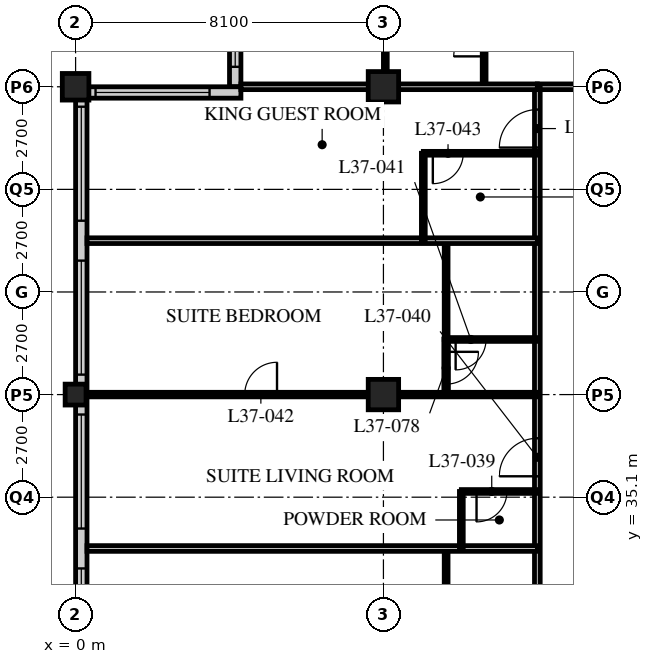
"""IFC4 building model, lengths in metres.
Left out: names, types, materials, properties, quantities, classifications, styles, units other than length and angle.
Written with IfcOpenShell. Run it as: python <this file> out.ifc"""

import sys

from ifc_helpers import new_model, si_unit, direction, frame, frame_2d, origin, origin_2d, place, context, subcontext, project, spatial, rectangle, hollow_rectangle, extrude, element, fill, save


model = new_model("IFC4")
c1 = context("Model", 3, precision=1e-05, world=origin(), true_north=direction((0.0, 1.0)))
c2 = subcontext(c1, "Body", "Model", "MODEL_VIEW")
j1 = project(units=[si_unit("LENGTHUNIT", "METRE"), si_unit("PLANEANGLEUNIT", "RADIAN")], contexts=[c1])
p1 = place(None, origin())
s1 = spatial("IfcSite", under=j1, at=p1, CompositionType="ELEMENT")
p2 = place(p1, origin())
s2 = spatial("IfcBuilding", under=s1, at=p2, CompositionType="ELEMENT")
p3 = place(p2, frame((0.0, 0.0, 144.2)))
s3 = spatial("IfcBuildingStorey", under=s2, at=p3, CompositionType="ELEMENT", Elevation=144.2)
p4 = place(p3, frame((0.0, 37.8, 0.0), z_axis=(0.0, 0.0, 1.0), x_axis=(1.0, 0.0, 0.0)))
e1 = element("IfcColumn", 1, at=p4, inside=s3, PredefinedType="COLUMN", context=c2, shape_type="SweptSolid", body=[
    extrude(hollow_rectangle(XDim=0.55, YDim=0.55, WallThickness=0.04, at=origin_2d()), origin(), (0.0, 0.0, 1.0), 3.4),
])
p5 = place(p3, frame((0.0, 45.9, 0.0), z_axis=(0.0, 0.0, 1.0), x_axis=(1.0, 0.0, 0.0)))
e2 = element("IfcColumn", 2, at=p5, inside=s3, PredefinedType="COLUMN", context=c2, shape_type="SweptSolid", body=[
    extrude(hollow_rectangle(XDim=0.7, YDim=0.7, WallThickness=0.07, at=origin_2d()), origin(), (0.0, 0.0, 1.0), 3.4),
])
for number, where, z_axis, x_axis in (
    (3, (8.1, 37.8, 0.0), (0.0, 0.0, 1.0), (1.0, 0.0, 0.0)),
    (4, (8.1, 45.9, 0.0), (0.0, 0.0, 1.0), (1.0, 0.0, 0.0)),
):
    element("IfcColumn", number, at=place(p3, frame(where, z_axis=z_axis, x_axis=x_axis)), inside=s3, PredefinedType="COLUMN", context=c2, shape_type="SweptSolid", body=[
        extrude(hollow_rectangle(XDim=0.8, YDim=0.8, WallThickness=0.08, at=origin_2d()), origin(), (0.0, 0.0, 1.0), 3.4),
    ])
p6 = place(p3, frame((4.2, 49.65, 0.0), z_axis=(0.0, 0.0, 1.0), x_axis=(0.0, -1.0, 0.0)))
e5 = element("IfcWall", 5, at=p6, inside=s3, PredefinedType="SOLIDWALL", context=c2, shape_type="SweptSolid", body=[
    extrude(rectangle(XDim=3.75, YDim=0.3, at=frame_2d((1.875, 0.0))), origin(), (0.0, 0.0, 1.0), 3.19),
])
p7 = place(p6, frame((0.225, 0.0, 0.9)))
e6 = element("IfcOpeningElement", 6, at=p7, cuts=e5, PredefinedType="OPENING", context=c2, shape_type="SweptSolid", body=[
    extrude(rectangle(XDim=3.0, YDim=1.4, at=frame_2d((1.5, 0.7))), frame((0.0, 0.16, 0.0), z_axis=(0.0, -1.0, 0.0), x_axis=(1.0, 0.0, 0.0)), (0.0, 0.0, 1.0), 0.32),
])
p8 = place(p3, frame((4.35, 45.75, 0.0), z_axis=(0.0, 0.0, 1.0), x_axis=(-1.0, 0.0, 0.0)))
e7 = element("IfcWall", 7, at=p8, inside=s3, PredefinedType="SOLIDWALL", context=c2, shape_type="SweptSolid", body=[
    extrude(rectangle(XDim=4.35, YDim=0.3, at=frame_2d((2.175, 0.0))), origin(), (0.0, 0.0, 1.0), 3.19),
])
p9 = place(p8, frame((0.825, 0.0, 0.9)))
e8 = element("IfcOpeningElement", 8, at=p9, cuts=e7, PredefinedType="OPENING", context=c2, shape_type="SweptSolid", body=[
    extrude(rectangle(XDim=3.0, YDim=1.4, at=frame_2d((1.5, 0.7))), frame((0.0, 0.16, 0.0), z_axis=(0.0, -1.0, 0.0), x_axis=(1.0, 0.0, 0.0)), (0.0, 0.0, 1.0), 0.32),
])
p10 = place(p3, frame((0.15, 45.6, 0.0), z_axis=(0.0, 0.0, 1.0), x_axis=(0.0, -1.0, 0.0)))
e9 = element("IfcWall", 9, at=p10, inside=s3, PredefinedType="SOLIDWALL", context=c2, shape_type="SweptSolid", body=[
    extrude(rectangle(XDim=32.1, YDim=0.3, at=frame_2d((16.05, 0.0))), origin(), (0.0, 0.0, 1.0), 3.19),
])
p11 = place(p10, frame((0.225, 0.0, 0.9)))
e10 = element("IfcOpeningElement", 10, at=p11, cuts=e9, PredefinedType="OPENING", context=c2, shape_type="SweptSolid", body=[
    extrude(rectangle(XDim=3.0, YDim=1.4, at=frame_2d((1.5, 0.7))), frame((0.0, 0.16, 0.0), z_axis=(0.0, -1.0, 0.0), x_axis=(1.0, 0.0, 0.0)), (0.0, 0.0, 1.0), 0.32),
])
p12 = place(p10, frame((4.275, 0.0, 0.9)))
e11 = element("IfcOpeningElement", 11, at=p12, cuts=e9, PredefinedType="OPENING", context=c2, shape_type="SweptSolid", body=[
    extrude(rectangle(XDim=3.0, YDim=1.4, at=frame_2d((1.5, 0.7))), frame((0.0, 0.16, 0.0), z_axis=(0.0, -1.0, 0.0), x_axis=(1.0, 0.0, 0.0)), (0.0, 0.0, 1.0), 0.32),
])
p13 = place(p10, frame((8.325, 0.0, 0.9)))
e12 = element("IfcOpeningElement", 12, at=p13, cuts=e9, PredefinedType="OPENING", context=c2, shape_type="SweptSolid", body=[
    extrude(rectangle(XDim=3.0, YDim=1.4, at=frame_2d((1.5, 0.7))), frame((0.0, 0.16, 0.0), z_axis=(0.0, -1.0, 0.0), x_axis=(1.0, 0.0, 0.0)), (0.0, 0.0, 1.0), 0.32),
])
p14 = place(p10, frame((12.375, 0.0, 0.9)))
e13 = element("IfcOpeningElement", 13, at=p14, cuts=e9, PredefinedType="OPENING", context=c2, shape_type="SweptSolid", body=[
    extrude(rectangle(XDim=3.0, YDim=1.4, at=frame_2d((1.5, 0.7))), frame((0.0, 0.16, 0.0), z_axis=(0.0, -1.0, 0.0), x_axis=(1.0, 0.0, 0.0)), (0.0, 0.0, 1.0), 0.32),
])
p15 = place(p10, frame((16.425, 0.0, 0.9)))
e14 = element("IfcOpeningElement", 14, at=p15, cuts=e9, PredefinedType="OPENING", context=c2, shape_type="SweptSolid", body=[
    extrude(rectangle(XDim=3.0, YDim=1.4, at=frame_2d((1.5, 0.7))), frame((0.0, 0.16, 0.0), z_axis=(0.0, -1.0, 0.0), x_axis=(1.0, 0.0, 0.0)), (0.0, 0.0, 1.0), 0.32),
])
p16 = place(p10, frame((20.475, 0.0, 0.9)))
e15 = element("IfcOpeningElement", 15, at=p16, cuts=e9, PredefinedType="OPENING", context=c2, shape_type="SweptSolid", body=[
    extrude(rectangle(XDim=3.0, YDim=1.4, at=frame_2d((1.5, 0.7))), frame((0.0, 0.16, 0.0), z_axis=(0.0, -1.0, 0.0), x_axis=(1.0, 0.0, 0.0)), (0.0, 0.0, 1.0), 0.32),
])
p17 = place(p10, frame((24.525, 0.0, 0.9)))
e16 = element("IfcOpeningElement", 16, at=p17, cuts=e9, PredefinedType="OPENING", context=c2, shape_type="SweptSolid", body=[
    extrude(rectangle(XDim=3.0, YDim=1.4, at=frame_2d((1.5, 0.7))), frame((0.0, 0.16, 0.0), z_axis=(0.0, -1.0, 0.0), x_axis=(1.0, 0.0, 0.0)), (0.0, 0.0, 1.0), 0.32),
])
p18 = place(p10, frame((28.575, 0.0, 0.9)))
e17 = element("IfcOpeningElement", 17, at=p18, cuts=e9, PredefinedType="OPENING", context=c2, shape_type="SweptSolid", body=[
    extrude(rectangle(XDim=3.0, YDim=1.4, at=frame_2d((1.5, 0.7))), frame((0.0, 0.16, 0.0), z_axis=(0.0, -1.0, 0.0), x_axis=(1.0, 0.0, 0.0)), (0.0, 0.0, 1.0), 0.32),
])
p19 = place(p3, frame((12.15, 45.9, 0.0), z_axis=(0.0, 0.0, 1.0), x_axis=(1.0, 0.0, 0.0)))
e18 = element("IfcWall", 18, at=p19, inside=s3, PredefinedType="PARTITIONING", context=c2, shape_type="SweptSolid", body=[
    extrude(rectangle(XDim=36.45, YDim=0.15, at=frame_2d((18.225, 0.0))), origin(), (0.0, 0.0, 1.0), 2.42),
])
p20 = place(p19, frame((9.225, 0.0, 0.0)))
e19 = element("IfcOpeningElement", 19, at=p20, cuts=e18, PredefinedType="OPENING", context=c2, shape_type="SweptSolid", body=[
    extrude(rectangle(XDim=1.8, YDim=2.4, at=frame_2d((0.9, 1.2))), frame((0.0, 0.085, 0.0), z_axis=(0.0, -1.0, 0.0), x_axis=(1.0, 0.0, 0.0)), (0.0, 0.0, 1.0), 0.17),
])
p21 = place(p19, frame((21.65, 0.0, 0.0)))
e20 = element("IfcOpeningElement", 20, at=p21, cuts=e18, PredefinedType="OPENING", context=c2, shape_type="SweptSolid", body=[
    extrude(rectangle(XDim=1.0, YDim=2.1, at=frame_2d((0.5, 1.05))), frame((0.0, 0.085, 0.0), z_axis=(0.0, -1.0, 0.0), x_axis=(1.0, 0.0, 0.0)), (0.0, 0.0, 1.0), 0.17),
])
p22 = place(p19, frame((24.9, 0.0, 0.0)))
e21 = element("IfcOpeningElement", 21, at=p22, cuts=e18, PredefinedType="OPENING", context=c2, shape_type="SweptSolid", body=[
    extrude(rectangle(XDim=1.0, YDim=2.1, at=frame_2d((0.5, 1.05))), frame((0.0, 0.085, 0.0), z_axis=(0.0, -1.0, 0.0), x_axis=(1.0, 0.0, 0.0)), (0.0, 0.0, 1.0), 0.17),
])
p23 = place(p19, frame((30.8, 0.0, 0.0)))
e22 = element("IfcOpeningElement", 22, at=p23, cuts=e18, PredefinedType="OPENING", context=c2, shape_type="SweptSolid", body=[
    extrude(rectangle(XDim=1.0, YDim=2.1, at=frame_2d((0.5, 1.05))), frame((0.0, 0.085, 0.0), z_axis=(0.0, -1.0, 0.0), x_axis=(1.0, 0.0, 0.0)), (0.0, 0.0, 1.0), 0.17),
])
p24 = place(p19, frame((32.825, 0.0, 0.0)))
e23 = element("IfcOpeningElement", 23, at=p24, cuts=e18, PredefinedType="OPENING", context=c2, shape_type="SweptSolid", body=[
    extrude(rectangle(XDim=1.0, YDim=2.1, at=frame_2d((0.5, 1.05))), frame((0.0, 0.085, 0.0), z_axis=(0.0, -1.0, 0.0), x_axis=(1.0, 0.0, 0.0)), (0.0, 0.0, 1.0), 0.17),
])
p25 = place(p19, frame((1.525, 0.0, 0.0)))
e24 = element("IfcOpeningElement", 24, at=p25, cuts=e18, PredefinedType="OPENING", context=c2, shape_type="SweptSolid", body=[
    extrude(rectangle(XDim=1.0, YDim=2.1, at=frame_2d((0.5, 1.05))), frame((0.0, 0.085, 0.0), z_axis=(0.0, -1.0, 0.0), x_axis=(1.0, 0.0, 0.0)), (0.0, 0.0, 1.0), 0.17),
])
p26 = place(p3, frame((12.15, 21.6, 0.0), z_axis=(0.0, 0.0, 1.0), x_axis=(0.0, 1.0, 0.0)))
e25 = element("IfcWall", 25, at=p26, inside=s3, PredefinedType="PARTITIONING", context=c2, shape_type="SweptSolid", body=[
    extrude(rectangle(XDim=24.3, YDim=0.15, at=frame_2d((12.15, 0.0))), origin(), (0.0, 0.0, 1.0), 3.19),
])
p27 = place(p26, frame((5.575, 0.0, 0.0)))
e26 = element("IfcOpeningElement", 26, at=p27, cuts=e25, PredefinedType="OPENING", context=c2, shape_type="SweptSolid", body=[
    extrude(rectangle(XDim=1.0, YDim=2.1, at=frame_2d((0.5, 1.05))), frame((0.0, 0.085, 0.0), z_axis=(0.0, -1.0, 0.0), x_axis=(1.0, 0.0, 0.0)), (0.0, 0.0, 1.0), 0.17),
])
p28 = place(p26, frame((14.05, 0.0, 0.0)))
e27 = element("IfcOpeningElement", 27, at=p28, cuts=e25, PredefinedType="OPENING", context=c2, shape_type="SweptSolid", body=[
    extrude(rectangle(XDim=1.0, YDim=2.1, at=frame_2d((0.5, 1.05))), frame((0.0, 0.085, 0.0), z_axis=(0.0, -1.0, 0.0), x_axis=(1.0, 0.0, 0.0)), (0.0, 0.0, 1.0), 0.17),
])
p29 = place(p26, frame((22.7, 0.0, 0.0)))
e28 = element("IfcOpeningElement", 28, at=p29, cuts=e25, PredefinedType="OPENING", context=c2, shape_type="SweptSolid", body=[
    extrude(rectangle(XDim=1.0, YDim=2.1, at=frame_2d((0.5, 1.05))), frame((0.0, 0.085, 0.0), z_axis=(0.0, -1.0, 0.0), x_axis=(1.0, 0.0, 0.0)), (0.0, 0.0, 1.0), 0.17),
])
p30 = place(p3, frame((9.75, 31.15, 0.0), z_axis=(0.0, 0.0, 1.0), x_axis=(0.0, 1.0, 0.0)))
e29 = element("IfcWall", 29, at=p30, inside=s3, PredefinedType="PARTITIONING", context=c2, shape_type="SweptSolid", body=[
    extrude(rectangle(XDim=2.6, YDim=0.1, at=frame_2d((1.3, 0.0))), origin(), (0.0, 0.0, 1.0), 3.19),
])
p31 = place(p3, frame((12.15, 33.75, 0.0), z_axis=(0.0, 0.0, 1.0), x_axis=(-1.0, 0.0, 0.0)))
e30 = element("IfcWall", 30, at=p31, inside=s3, PredefinedType="PARTITIONING", context=c2, shape_type="SweptSolid", body=[
    extrude(rectangle(XDim=11.85, YDim=0.15, at=frame_2d((5.925, 0.0))), origin(), (0.0, 0.0, 1.0), 3.19),
])
p32 = place(p3, frame((10.15, 33.75, 0.0), z_axis=(0.0, 0.0, 1.0), x_axis=(0.0, 1.0, 0.0)))
e31 = element("IfcWall", 31, at=p32, inside=s3, PredefinedType="PARTITIONING", context=c2, shape_type="SweptSolid", body=[
    extrude(rectangle(XDim=1.5, YDim=0.1, at=frame_2d((0.75, 0.0))), origin(), (0.0, 0.0, 1.0), 3.19),
])
p33 = place(p3, frame((12.15, 35.25, 0.0), z_axis=(0.0, 0.0, 1.0), x_axis=(-1.0, 0.0, 0.0)))
e32 = element("IfcWall", 32, at=p33, inside=s3, PredefinedType="PARTITIONING", context=c2, shape_type="SweptSolid", body=[
    extrude(rectangle(XDim=2.0, YDim=0.1, at=frame_2d((1.0, 0.0))), origin(), (0.0, 0.0, 1.0), 3.19),
])
p34 = place(p33, frame((0.8, 0.0, 0.0)))
e33 = element("IfcOpeningElement", 33, at=p34, cuts=e32, PredefinedType="OPENING", context=c2, shape_type="SweptSolid", body=[
    extrude(rectangle(XDim=0.8, YDim=2.1, at=frame_2d((0.4, 1.05))), frame((0.0, 0.06, 0.0), z_axis=(0.0, -1.0, 0.0), x_axis=(1.0, 0.0, 0.0)), (0.0, 0.0, 1.0), 0.12),
])
p35 = place(p3, frame((9.75, 39.25, 0.0), z_axis=(0.0, 0.0, 1.0), x_axis=(0.0, 1.0, 0.0)))
e34 = element("IfcWall", 34, at=p35, inside=s3, PredefinedType="PARTITIONING", context=c2, shape_type="SweptSolid", body=[
    extrude(rectangle(XDim=2.6, YDim=0.1, at=frame_2d((1.3, 0.0))), origin(), (0.0, 0.0, 1.0), 3.19),
])
p36 = place(p3, frame((12.15, 39.25, 0.0), z_axis=(0.0, 0.0, 1.0), x_axis=(-1.0, 0.0, 0.0)))
e35 = element("IfcWall", 35, at=p36, inside=s3, PredefinedType="PARTITIONING", context=c2, shape_type="SweptSolid", body=[
    extrude(rectangle(XDim=2.4, YDim=0.1, at=frame_2d((1.2, 0.0))), origin(), (0.0, 0.0, 1.0), 3.19),
])
p37 = place(p36, frame((1.35, 0.0, 0.0)))
e36 = element("IfcOpeningElement", 36, at=p37, cuts=e35, PredefinedType="OPENING", context=c2, shape_type="SweptSolid", body=[
    extrude(rectangle(XDim=0.8, YDim=2.1, at=frame_2d((0.4, 1.05))), frame((0.0, 0.06, 0.0), z_axis=(0.0, -1.0, 0.0), x_axis=(1.0, 0.0, 0.0)), (0.0, 0.0, 1.0), 0.12),
])
p38 = place(p3, frame((12.15, 37.8, 0.0), z_axis=(0.0, 0.0, 1.0), x_axis=(-1.0, 0.0, 0.0)))
e37 = element("IfcWall", 37, at=p38, inside=s3, PredefinedType="PARTITIONING", context=c2, shape_type="SweptSolid", body=[
    extrude(rectangle(XDim=11.85, YDim=0.12, at=frame_2d((5.925, 0.0))), origin(), (0.0, 0.0, 1.0), 2.42),
])
p39 = place(p38, frame((6.85, 0.0, 0.0)))
e38 = element("IfcOpeningElement", 38, at=p39, cuts=e37, PredefinedType="OPENING", context=c2, shape_type="SweptSolid", body=[
    extrude(rectangle(XDim=0.85, YDim=2.1, at=frame_2d((0.425, 1.05))), frame((0.0, 0.07, 0.0), z_axis=(0.0, -1.0, 0.0), x_axis=(1.0, 0.0, 0.0)), (0.0, 0.0, 1.0), 0.14),
])
p40 = place(p3, frame((12.15, 41.85, 0.0), z_axis=(0.0, 0.0, 1.0), x_axis=(-1.0, 0.0, 0.0)))
e39 = element("IfcWall", 39, at=p40, inside=s3, PredefinedType="PARTITIONING", context=c2, shape_type="SweptSolid", body=[
    extrude(rectangle(XDim=11.85, YDim=0.15, at=frame_2d((5.925, 0.0))), origin(), (0.0, 0.0, 1.0), 3.19),
])
p41 = place(p3, frame((9.15, 41.85, 0.0), z_axis=(0.0, 0.0, 1.0), x_axis=(0.0, 1.0, 0.0)))
e40 = element("IfcWall", 40, at=p41, inside=s3, PredefinedType="PARTITIONING", context=c2, shape_type="SweptSolid", body=[
    extrude(rectangle(XDim=2.3, YDim=0.1, at=frame_2d((1.15, 0.0))), origin(), (0.0, 0.0, 1.0), 3.19),
])
p42 = place(p3, frame((12.15, 44.15, 0.0), z_axis=(0.0, 0.0, 1.0), x_axis=(-1.0, 0.0, 0.0)))
e41 = element("IfcWall", 41, at=p42, inside=s3, PredefinedType="PARTITIONING", context=c2, shape_type="SweptSolid", body=[
    extrude(rectangle(XDim=3.0, YDim=0.1, at=frame_2d((1.5, 0.0))), origin(), (0.0, 0.0, 1.0), 3.19),
])
p43 = place(p42, frame((1.95, 0.0, 0.0)))
e42 = element("IfcOpeningElement", 42, at=p43, cuts=e41, PredefinedType="OPENING", context=c2, shape_type="SweptSolid", body=[
    extrude(rectangle(XDim=0.8, YDim=2.1, at=frame_2d((0.4, 1.05))), frame((0.0, 0.06, 0.0), z_axis=(0.0, -1.0, 0.0), x_axis=(1.0, 0.0, 0.0)), (0.0, 0.0, 1.0), 0.12),
])
p44 = place(p3, frame((10.75, 45.9, 0.0), z_axis=(0.0, 0.0, 1.0), x_axis=(0.0, 1.0, 0.0)))
e43 = element("IfcWall", 43, at=p44, inside=s3, PredefinedType="PARTITIONING", context=c2, shape_type="SweptSolid", body=[
    extrude(rectangle(XDim=2.4, YDim=0.1, at=frame_2d((1.2, 0.0))), origin(), (0.0, 0.0, 1.0), 3.19),
])
p45 = place(p44, frame((0.8, 0.0, 0.0)))
e44 = element("IfcOpeningElement", 44, at=p45, cuts=e43, PredefinedType="OPENING", context=c2, shape_type="SweptSolid", body=[
    extrude(rectangle(XDim=0.8, YDim=2.1, at=frame_2d((0.4, 1.05))), frame((0.0, 0.06, 0.0), z_axis=(0.0, -1.0, 0.0), x_axis=(1.0, 0.0, 0.0)), (0.0, 0.0, 1.0), 0.12),
])
p46 = place(p3, frame((8.15, 45.9, 0.0), z_axis=(0.0, 0.0, 1.0), x_axis=(0.0, 1.0, 0.0)))
e45 = element("IfcWall", 45, at=p46, inside=s3, PredefinedType="PARTITIONING", context=c2, shape_type="SweptSolid", body=[
    extrude(rectangle(XDim=2.4, YDim=0.1, at=frame_2d((1.2, 0.0))), origin(), (0.0, 0.0, 1.0), 2.42),
])
p47 = place(p3, frame((4.35, 45.9, 0.0), z_axis=(0.0, 0.0, 1.0), x_axis=(1.0, 0.0, 0.0)))
e46 = element("IfcWall", 46, at=p47, inside=s3, PredefinedType="PARTITIONING", context=c2, shape_type="SweptSolid", body=[
    extrude(rectangle(XDim=7.8, YDim=0.15, at=frame_2d((3.9, 0.0))), origin(), (0.0, 0.0, 1.0), 2.42),
])
p48 = place(p3, frame((9.75, 37.8, 0.0), z_axis=(0.0, 0.0, 1.0), x_axis=(0.0, 1.0, 0.0)))
e47 = element("IfcWall", 47, at=p48, inside=s3, PredefinedType="PARTITIONING", context=c2, shape_type="SweptSolid", body=[
    extrude(rectangle(XDim=1.46, YDim=0.12, at=frame_2d((0.73, 0.0))), origin(), (0.0, 0.0, 1.0), 3.19),
])
p49 = place(p48, frame((0.275, 0.0, 0.0)))
e48 = element("IfcOpeningElement", 48, at=p49, cuts=e47, PredefinedType="OPENING", context=c2, shape_type="SweptSolid", body=[
    extrude(rectangle(XDim=0.85, YDim=2.1, at=frame_2d((0.425, 1.05))), frame((0.0, 0.07, 0.0), z_axis=(0.0, -1.0, 0.0), x_axis=(1.0, 0.0, 0.0)), (0.0, 0.0, 1.0), 0.14),
])
p50 = place(p7, origin())
e49 = element("IfcWindow", 49, at=p50, inside=s3, PartitioningType="SINGLE_PANEL", PredefinedType="WINDOW", context=c2, shape_type="SweptSolid", body=[
    extrude(rectangle(XDim=3.0, YDim=1.4, at=frame_2d((1.5, 0.7))), frame((0.0, 0.03, 0.0), z_axis=(0.0, -1.0, 0.0), x_axis=(1.0, 0.0, 0.0)), (0.0, 0.0, 1.0), 0.06),
])
fill(e6, e49)
p51 = place(p9, origin())
e50 = element("IfcWindow", 50, at=p51, inside=s3, PartitioningType="SINGLE_PANEL", PredefinedType="WINDOW", context=c2, shape_type="SweptSolid", body=[
    extrude(rectangle(XDim=3.0, YDim=1.4, at=frame_2d((1.5, 0.7))), frame((0.0, 0.03, 0.0), z_axis=(0.0, -1.0, 0.0), x_axis=(1.0, 0.0, 0.0)), (0.0, 0.0, 1.0), 0.06),
])
fill(e8, e50)
p52 = place(p11, origin())
e51 = element("IfcWindow", 51, at=p52, inside=s3, PartitioningType="SINGLE_PANEL", PredefinedType="WINDOW", context=c2, shape_type="SweptSolid", body=[
    extrude(rectangle(XDim=3.0, YDim=1.4, at=frame_2d((1.5, 0.7))), frame((0.0, 0.03, 0.0), z_axis=(0.0, -1.0, 0.0), x_axis=(1.0, 0.0, 0.0)), (0.0, 0.0, 1.0), 0.06),
])
fill(e10, e51)
p53 = place(p12, origin())
e52 = element("IfcWindow", 52, at=p53, inside=s3, PartitioningType="SINGLE_PANEL", PredefinedType="WINDOW", context=c2, shape_type="SweptSolid", body=[
    extrude(rectangle(XDim=3.0, YDim=1.4, at=frame_2d((1.5, 0.7))), frame((0.0, 0.03, 0.0), z_axis=(0.0, -1.0, 0.0), x_axis=(1.0, 0.0, 0.0)), (0.0, 0.0, 1.0), 0.06),
])
fill(e11, e52)
p54 = place(p13, origin())
e53 = element("IfcWindow", 53, at=p54, inside=s3, PartitioningType="SINGLE_PANEL", PredefinedType="WINDOW", context=c2, shape_type="SweptSolid", body=[
    extrude(rectangle(XDim=3.0, YDim=1.4, at=frame_2d((1.5, 0.7))), frame((0.0, 0.03, 0.0), z_axis=(0.0, -1.0, 0.0), x_axis=(1.0, 0.0, 0.0)), (0.0, 0.0, 1.0), 0.06),
])
fill(e12, e53)
p55 = place(p14, origin())
e54 = element("IfcWindow", 54, at=p55, inside=s3, PartitioningType="SINGLE_PANEL", PredefinedType="WINDOW", context=c2, shape_type="SweptSolid", body=[
    extrude(rectangle(XDim=3.0, YDim=1.4, at=frame_2d((1.5, 0.7))), frame((0.0, 0.03, 0.0), z_axis=(0.0, -1.0, 0.0), x_axis=(1.0, 0.0, 0.0)), (0.0, 0.0, 1.0), 0.06),
])
fill(e13, e54)
p56 = place(p34, origin())
e55 = element("IfcDoor", 55, at=p56, inside=s3, OperationType="SINGLE_SWING_RIGHT", PredefinedType="DOOR", context=c2, shape_type="SweptSolid", body=[
    extrude(rectangle(XDim=0.8, YDim=2.1, at=frame_2d((0.4, 1.05))), frame((0.0, 0.025, 0.0), z_axis=(0.0, -1.0, 0.0), x_axis=(1.0, 0.0, 0.0)), (0.0, 0.0, 1.0), 0.05),
])
fill(e33, e55)
p57 = place(p28, origin())
e56 = element("IfcDoor", 56, at=p57, inside=s3, OperationType="SINGLE_SWING_LEFT", PredefinedType="DOOR", context=c2, shape_type="SweptSolid", body=[
    extrude(rectangle(XDim=1.0, YDim=2.1, at=frame_2d((0.5, 1.05))), frame((0.0, 0.025, 0.0), z_axis=(0.0, -1.0, 0.0), x_axis=(1.0, 0.0, 0.0)), (0.0, 0.0, 1.0), 0.05),
])
fill(e27, e56)
p58 = place(p37, origin())
e57 = element("IfcDoor", 57, at=p58, inside=s3, OperationType="SINGLE_SWING_RIGHT", PredefinedType="DOOR", context=c2, shape_type="SweptSolid", body=[
    extrude(rectangle(XDim=0.8, YDim=2.1, at=frame_2d((0.4, 1.05))), frame((0.0, 0.025, 0.0), z_axis=(0.0, -1.0, 0.0), x_axis=(1.0, 0.0, 0.0)), (0.0, 0.0, 1.0), 0.05),
])
fill(e36, e57)
p59 = place(p39, origin())
e58 = element("IfcDoor", 58, at=p59, inside=s3, OperationType="SINGLE_SWING_RIGHT", PredefinedType="DOOR", context=c2, shape_type="SweptSolid", body=[
    extrude(rectangle(XDim=0.85, YDim=2.1, at=frame_2d((0.425, 1.05))), frame((0.0, 0.025, 0.0), z_axis=(0.0, -1.0, 0.0), x_axis=(1.0, 0.0, 0.0)), (0.0, 0.0, 1.0), 0.05),
])
fill(e38, e58)
p60 = place(p43, origin())
e59 = element("IfcDoor", 59, at=p60, inside=s3, OperationType="SINGLE_SWING_RIGHT", PredefinedType="DOOR", context=c2, shape_type="SweptSolid", body=[
    extrude(rectangle(XDim=0.8, YDim=2.1, at=frame_2d((0.4, 1.05))), frame((0.0, 0.025, 0.0), z_axis=(0.0, -1.0, 0.0), x_axis=(1.0, 0.0, 0.0)), (0.0, 0.0, 1.0), 0.05),
])
fill(e42, e59)
p61 = place(p29, origin())
e60 = element("IfcDoor", 60, at=p61, inside=s3, OperationType="SINGLE_SWING_LEFT", PredefinedType="DOOR", context=c2, shape_type="SweptSolid", body=[
    extrude(rectangle(XDim=1.0, YDim=2.1, at=frame_2d((0.5, 1.05))), frame((0.0, 0.025, 0.0), z_axis=(0.0, -1.0, 0.0), x_axis=(1.0, 0.0, 0.0)), (0.0, 0.0, 1.0), 0.05),
])
fill(e28, e60)
p62 = place(p45, origin())
e61 = element("IfcDoor", 61, at=p62, inside=s3, OperationType="SINGLE_SWING_LEFT", PredefinedType="DOOR", context=c2, shape_type="SweptSolid", body=[
    extrude(rectangle(XDim=0.8, YDim=2.1, at=frame_2d((0.4, 1.05))), frame((0.0, 0.025, 0.0), z_axis=(0.0, -1.0, 0.0), x_axis=(1.0, 0.0, 0.0)), (0.0, 0.0, 1.0), 0.05),
])
fill(e44, e61)
p63 = place(p49, origin())
e62 = element("IfcDoor", 62, at=p63, inside=s3, OperationType="SINGLE_SWING_LEFT", PredefinedType="DOOR", context=c2, shape_type="SweptSolid", body=[
    extrude(rectangle(XDim=0.85, YDim=2.1, at=frame_2d((0.425, 1.05))), frame((0.0, 0.025, 0.0), z_axis=(0.0, -1.0, 0.0), x_axis=(1.0, 0.0, 0.0)), (0.0, 0.0, 1.0), 0.05),
])
fill(e48, e62)
save(model, sys.argv[1])
